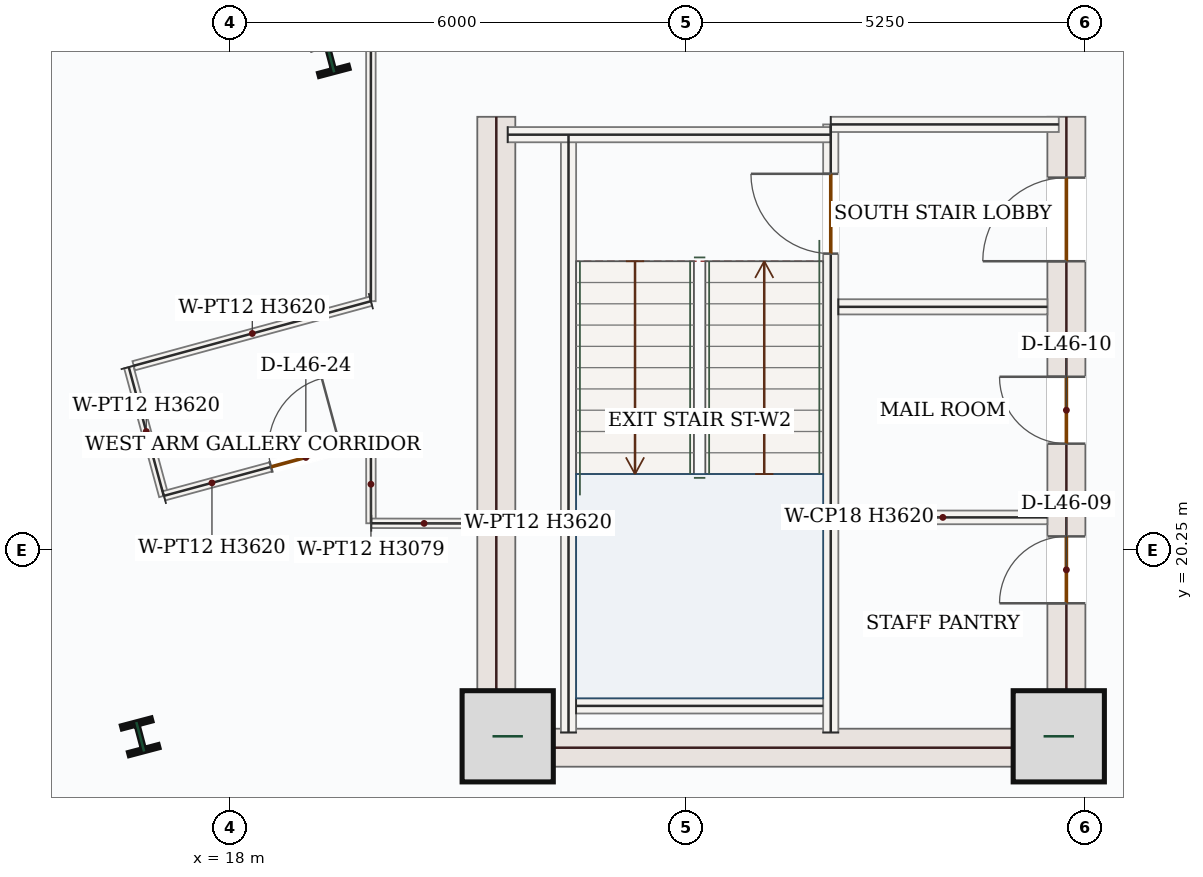
"""IFC4 building model, lengths in metres.
Left out: names, types, materials, properties, quantities, classifications, styles, units other than length and angle.
Written with IfcOpenShell. Run it as: python <this file> out.ifc"""

import sys

from ifc_helpers import new_model, si_unit, direction, frame, frame_2d, origin, origin_2d, place, context, subcontext, project, spatial, rectangle, i_section, extrude, source, transform, mapped, element, fill, save


model = new_model("IFC4")
c1 = context("Model", 3, precision=1e-05, world=origin(), true_north=direction((0.0, 1.0)))
c2 = subcontext(c1, "Body", "Model", "MODEL_VIEW")
j1 = project(units=[si_unit("LENGTHUNIT", "METRE"), si_unit("PLANEANGLEUNIT", "RADIAN")], contexts=[c1])
p1 = place(None, origin())
s1 = spatial("IfcSite", under=j1, at=p1, CompositionType="ELEMENT")
p2 = place(p1, origin())
s2 = spatial("IfcBuilding", under=s1, at=p2, CompositionType="ELEMENT")
p3 = place(p2, frame((0.0, 0.0, 198.0)))
s3 = spatial("IfcBuildingStorey", under=s2, at=p3, CompositionType="ELEMENT", Elevation=198.0)
m1 = source(origin(), c2, "Body", "SweptSolid", [
    extrude(rectangle(XDim=8.55, YDim=0.5, at=frame_2d((4.275, 0.0))), origin(), (0.0, 0.0, 1.0), 3.62),
])
p4 = place(p3, frame((21.5, 17.4, 0.0), z_axis=(0.0, 0.0, 1.0), x_axis=(0.0, 1.0, 0.0)))
e1 = element("IfcWall", 1, at=p4, inside=s3, PredefinedType="SHEAR", context=c2, shape_type="MappedRepresentation", body=[
    mapped(m1, transform((0.0, 0.0, 0.0), x_axis=(1.0, 0.0, 0.0), y_axis=(0.0, 1.0, 0.0), z_axis=(0.0, 0.0, 1.0), scale=1.0)),
])
p5 = place(p3, frame((29.0, 17.4, 0.0), z_axis=(0.0, 0.0, 1.0), x_axis=(0.0, 1.0, 0.0)))
e2 = element("IfcWall", 2, at=p5, inside=s3, PredefinedType="SHEAR", context=c2, shape_type="SweptSolid", body=[
    extrude(rectangle(XDim=8.55, YDim=0.5, at=frame_2d((4.275, 0.0))), origin(), (0.0, 0.0, 1.0), 3.62),
])
p6 = place(p5, frame((6.65, 0.0, 0.0)))
e3 = element("IfcOpeningElement", 3, at=p6, cuts=e2, PredefinedType="OPENING", context=c2, shape_type="SweptSolid", body=[
    extrude(rectangle(XDim=1.1, YDim=2.2, at=frame_2d((0.55, 1.1))), frame((0.0, 0.26, 0.0), z_axis=(0.0, -1.0, 0.0), x_axis=(1.0, 0.0, 0.0)), (0.0, 0.0, 1.0), 0.52),
])
p7 = place(p5, frame((2.15, 0.0, 0.0)))
e4 = element("IfcOpeningElement", 4, at=p7, cuts=e2, PredefinedType="OPENING", context=c2, shape_type="SweptSolid", body=[
    extrude(rectangle(XDim=0.88, YDim=2.1, at=frame_2d((0.44, 1.05))), frame((0.0, 0.26, 0.0), z_axis=(0.0, -1.0, 0.0), x_axis=(1.0, 0.0, 0.0)), (0.0, 0.0, 1.0), 0.52),
])
p8 = place(p5, frame((4.25, 0.0, 0.0)))
e5 = element("IfcOpeningElement", 5, at=p8, cuts=e2, PredefinedType="OPENING", context=c2, shape_type="SweptSolid", body=[
    extrude(rectangle(XDim=0.88, YDim=2.1, at=frame_2d((0.44, 1.05))), frame((0.0, 0.26, 0.0), z_axis=(0.0, -1.0, 0.0), x_axis=(1.0, 0.0, 0.0)), (0.0, 0.0, 1.0), 0.52),
])
m2 = source(origin(), c2, "Body", "SweptSolid", [
    extrude(rectangle(XDim=7.0, YDim=0.5, at=frame_2d((3.5, 0.0))), origin(), (0.0, 0.0, 1.0), 3.62),
])
p9 = place(p3, frame((21.75, 17.65, 0.0), z_axis=(0.0, 0.0, 1.0), x_axis=(1.0, 0.0, 0.0)))
e6 = element("IfcWall", 6, at=p9, inside=s3, PredefinedType="SHEAR", context=c2, shape_type="MappedRepresentation", body=[
    mapped(m2, transform((0.0, 0.0, 0.0), x_axis=(1.0, 0.0, 0.0), y_axis=(0.0, 1.0, 0.0), z_axis=(0.0, 0.0, 1.0), scale=1.0)),
])
m3 = source(origin(), c2, "Body", "SweptSolid", [
    extrude(rectangle(XDim=1.2, YDim=1.2, at=origin_2d()), origin(), (0.0, 0.0, 1.0), 3.9),
])
for number, where, z_axis, x_axis in (
    (7, (21.65, 17.8, 0.0), (0.0, 0.0, 1.0), (1.0, 0.0, 0.0)),
    (8, (28.9, 17.8, 0.0), (0.0, 0.0, 1.0), (1.0, 0.0, 0.0)),
):
    element("IfcColumn", number, at=place(p3, frame(where, z_axis=z_axis, x_axis=x_axis)), inside=s3, PredefinedType="COLUMN", context=c2, shape_type="MappedRepresentation", body=[
        mapped(m3, transform((0.0, 0.0, 0.0), x_axis=(1.0, 0.0, 0.0), y_axis=(0.0, 1.0, 0.0), z_axis=(0.0, 0.0, 1.0), scale=1.0)),
    ])
m4 = source(origin(), c2, "Body", "SweptSolid", [
    extrude(i_section(OverallWidth=0.404, OverallDepth=0.407, WebThickness=0.027, FlangeThickness=0.044, FilletRadius=0.018, at=origin_2d()), origin(), (0.0, 0.0, 1.0), 3.9),
])
for number, where, z_axis, x_axis in (
    (9, (19.316, 26.729, 0.0), (0.0, 0.0, 1.0), (0.967, 0.255, 0.0)),
    (10, (16.815, 17.794, 0.0), (0.0, 0.0, 1.0), (0.967, 0.255, 0.0)),
):
    element("IfcColumn", number, at=place(p3, frame(where, z_axis=z_axis, x_axis=x_axis)), inside=s3, PredefinedType="COLUMN", context=c2, shape_type="MappedRepresentation", body=[
        mapped(m4, transform((0.0, 0.0, 0.0), x_axis=(1.0, 0.0, 0.0), y_axis=(0.0, 1.0, 0.0), z_axis=(0.0, 0.0, 1.0), scale=1.0)),
    ])
m5 = source(origin(), c2, "Body", "SweptSolid", [
    extrude(rectangle(XDim=9.291, YDim=0.28, at=frame_2d((4.646, 0.0))), origin(), (0.0, 0.0, 1.0), 3.62),
])
p10 = place(p3, frame((9.974, 26.83, 0.0), z_axis=(0.0, 0.0, 1.0), x_axis=(0.965014433153, 0.262196765439, 0.0)))
e11 = element("IfcWall", 11, at=p10, inside=s3, PredefinedType="SOLIDWALL", context=c2, shape_type="MappedRepresentation", body=[
    mapped(m5, transform((0.0, 0.0, 0.0), x_axis=(1.0, 0.0, 0.0), y_axis=(0.0, 1.0, 0.0), z_axis=(0.0, 0.0, 1.0), scale=1.0)),
])
m6 = source(origin(), c2, "Body", "SweptSolid", [
    extrude(rectangle(XDim=7.87, YDim=0.2, at=frame_2d((3.935, 0.0))), origin(), (0.0, 0.0, 1.0), 3.62),
])
p11 = place(p3, frame((22.45, 17.85, 0.0), z_axis=(0.0, 0.0, 1.0), x_axis=(0.0, 1.0, 0.0)))
e12 = element("IfcWall", 12, at=p11, inside=s3, PredefinedType="SOLIDWALL", context=c2, shape_type="MappedRepresentation", body=[
    mapped(m6, transform((0.0, 0.0, 0.0), x_axis=(1.0, 0.0, 0.0), y_axis=(0.0, 1.0, 0.0), z_axis=(0.0, 0.0, 1.0), scale=1.0)),
])
p12 = place(p3, frame((25.9, 17.85, 0.0), z_axis=(0.0, 0.0, 1.0), x_axis=(0.0, 1.0, 0.0)))
e13 = element("IfcWall", 13, at=p12, inside=s3, PredefinedType="SOLIDWALL", context=c2, shape_type="SweptSolid", body=[
    extrude(rectangle(XDim=8.0, YDim=0.2, at=frame_2d((4.0, 0.0))), origin(), (0.0, 0.0, 1.0), 3.62),
])
p13 = place(p12, frame((6.3, 0.0, 0.0)))
e14 = element("IfcOpeningElement", 14, at=p13, cuts=e13, PredefinedType="OPENING", context=c2, shape_type="SweptSolid", body=[
    extrude(rectangle(XDim=1.05, YDim=2.15, at=frame_2d((0.525, 1.075))), frame((0.0, 0.11, 0.0), z_axis=(0.0, -1.0, 0.0), x_axis=(1.0, 0.0, 0.0)), (0.0, 0.0, 1.0), 0.22),
])
m7 = source(origin(), c2, "Body", "SweptSolid", [
    extrude(rectangle(XDim=4.25, YDim=0.2, at=frame_2d((2.125, 0.0))), origin(), (0.0, 0.0, 1.0), 3.62),
])
p14 = place(p3, frame((21.65, 25.715, 0.0), z_axis=(0.0, 0.0, 1.0), x_axis=(1.0, 0.0, 0.0)))
e15 = element("IfcWall", 15, at=p14, inside=s3, PredefinedType="SOLIDWALL", context=c2, shape_type="MappedRepresentation", body=[
    mapped(m7, transform((0.0, 0.0, 0.0), x_axis=(1.0, 0.0, 0.0), y_axis=(0.0, 1.0, 0.0), z_axis=(0.0, 0.0, 1.0), scale=1.0)),
])
m8 = source(origin(), c2, "Body", "SweptSolid", [
    extrude(rectangle(XDim=3.0, YDim=0.2, at=frame_2d((1.5, 0.0))), origin(), (0.0, 0.0, 1.0), 3.62),
])
p15 = place(p3, frame((25.9, 25.85, 0.0), z_axis=(0.0, 0.0, 1.0), x_axis=(1.0, 0.0, 0.0)))
e16 = element("IfcWall", 16, at=p15, inside=s3, PredefinedType="SOLIDWALL", context=c2, shape_type="MappedRepresentation", body=[
    mapped(m8, transform((0.0, 0.0, 0.0), x_axis=(1.0, 0.0, 0.0), y_axis=(0.0, 1.0, 0.0), z_axis=(0.0, 0.0, 1.0), scale=1.0)),
])
m9 = source(origin(), c2, "Body", "SweptSolid", [
    extrude(rectangle(XDim=3.25, YDim=0.2, at=frame_2d((1.625, 0.0))), origin(), (0.0, 0.0, 1.0), 3.62),
])
p16 = place(p3, frame((22.55, 18.2, 0.0), z_axis=(0.0, 0.0, 1.0), x_axis=(1.0, 0.0, 0.0)))
e17 = element("IfcWall", 17, at=p16, inside=s3, PredefinedType="SOLIDWALL", context=c2, shape_type="MappedRepresentation", body=[
    mapped(m9, transform((0.0, 0.0, 0.0), x_axis=(1.0, 0.0, 0.0), y_axis=(0.0, 1.0, 0.0), z_axis=(0.0, 0.0, 1.0), scale=1.0)),
])
m10 = source(origin(), c2, "Body", "SweptSolid", [
    extrude(rectangle(XDim=2.75, YDim=0.2, at=frame_2d((1.375, 0.0))), origin(), (0.0, 0.0, 1.0), 3.62),
])
p17 = place(p3, frame((26.0, 23.45, 0.0), z_axis=(0.0, 0.0, 1.0), x_axis=(1.0, 0.0, 0.0)))
e18 = element("IfcWall", 18, at=p17, inside=s3, PredefinedType="SOLIDWALL", context=c2, shape_type="MappedRepresentation", body=[
    mapped(m10, transform((0.0, 0.0, 0.0), x_axis=(1.0, 0.0, 0.0), y_axis=(0.0, 1.0, 0.0), z_axis=(0.0, 0.0, 1.0), scale=1.0)),
])
m11 = source(origin(), c2, "Body", "SweptSolid", [
    extrude(rectangle(XDim=2.75, YDim=0.18, at=frame_2d((1.375, 0.0))), origin(), (0.0, 0.0, 1.0), 3.62),
])
p18 = place(p3, frame((26.0, 20.68, 0.0), z_axis=(0.0, 0.0, 1.0), x_axis=(1.0, 0.0, 0.0)))
e19 = element("IfcWall", 19, at=p18, inside=s3, PredefinedType="PARTITIONING", context=c2, shape_type="MappedRepresentation", body=[
    mapped(m11, transform((0.0, 0.0, 0.0), x_axis=(1.0, 0.0, 0.0), y_axis=(0.0, 1.0, 0.0), z_axis=(0.0, 0.0, 1.0), scale=1.0)),
])
m12 = source(origin(), c2, "Body", "SweptSolid", [
    extrude(rectangle(XDim=1.756, YDim=0.125, at=frame_2d((0.878, 0.0))), origin(), (0.0, 0.0, 1.0), 3.62),
])
p19 = place(p3, frame((16.665, 22.657, 0.0), z_axis=(0.0, 0.0, 1.0), x_axis=(0.262246637243, -0.965000881479, 0.0)))
e20 = element("IfcWall", 20, at=p19, inside=s3, PredefinedType="PARTITIONING", context=c2, shape_type="MappedRepresentation", body=[
    mapped(m12, transform((0.0, 0.0, 0.0), x_axis=(1.0, 0.0, 0.0), y_axis=(0.0, 1.0, 0.0), z_axis=(0.0, 0.0, 1.0), scale=1.0)),
])
p20 = place(p3, frame((17.127, 20.963, 0.0), z_axis=(0.0, 0.0, 1.0), x_axis=(0.965283220267, 0.261205483616, 0.0)))
e21 = element("IfcWall", 21, at=p20, inside=s3, PredefinedType="PARTITIONING", context=c2, shape_type="SweptSolid", body=[
    extrude(rectangle(XDim=2.821, YDim=0.125, at=frame_2d((1.41, 0.0))), origin(), (0.0, 0.0, 1.0), 3.62),
])
p21 = place(p20, frame((1.459, 0.0, 0.0)))
e22 = element("IfcOpeningElement", 22, at=p21, cuts=e21, PredefinedType="OPENING", context=c2, shape_type="SweptSolid", body=[
    extrude(rectangle(XDim=0.95, YDim=2.15, at=frame_2d((0.475, 1.075))), frame((0.0, 0.073, 0.0), z_axis=(0.0, -1.0, 0.0), x_axis=(1.0, 0.0, 0.0)), (0.0, 0.0, 1.0), 0.145),
])
m13 = source(origin(), c2, "Body", "SweptSolid", [
    extrude(rectangle(XDim=1.028, YDim=0.125, at=frame_2d((0.514, 0.0))), origin(), (0.0, 0.0, 1.0), 3.079),
])
p22 = place(p3, frame((19.85, 21.63, 0.0), z_axis=(0.0, 0.0, 1.0), x_axis=(0.001187365584, -0.999999295081, 0.0)))
e23 = element("IfcWall", 23, at=p22, inside=s3, PredefinedType="PARTITIONING", context=c2, shape_type="MappedRepresentation", body=[
    mapped(m13, transform((0.0, 0.0, 0.0), x_axis=(1.0, 0.0, 0.0), y_axis=(0.0, 1.0, 0.0), z_axis=(0.0, 0.0, 1.0), scale=1.0)),
])
m14 = source(origin(), c2, "Body", "SweptSolid", [
    extrude(rectangle(XDim=1.39, YDim=0.125, at=frame_2d((0.695, 0.0))), origin(), (0.0, 0.0, 1.0), 3.62),
])
p23 = place(p3, frame((19.855, 20.602, 0.0), z_axis=(0.0, 0.0, 1.0), x_axis=(0.999998750398, -0.001580886835, 0.0)))
e24 = element("IfcWall", 24, at=p23, inside=s3, PredefinedType="PARTITIONING", context=c2, shape_type="MappedRepresentation", body=[
    mapped(m14, transform((0.0, 0.0, 0.0), x_axis=(1.0, 0.0, 0.0), y_axis=(0.0, 1.0, 0.0), z_axis=(0.0, 0.0, 1.0), scale=1.0)),
])
m15 = source(origin(), c2, "Body", "SweptSolid", [
    extrude(rectangle(XDim=9.809, YDim=0.125, at=frame_2d((4.904, 0.0))), origin(), (0.0, 0.0, 1.0), 2.693),
])
p24 = place(p3, frame((19.85, 33.333, 0.0), z_axis=(0.0, 0.0, 1.0), x_axis=(-2.4890482e-05, -0.99999999969, 0.0)))
e25 = element("IfcWall", 25, at=p24, inside=s3, PredefinedType="PARTITIONING", context=c2, shape_type="MappedRepresentation", body=[
    mapped(m15, transform((0.0, 0.0, 0.0), x_axis=(1.0, 0.0, 0.0), y_axis=(0.0, 1.0, 0.0), z_axis=(0.0, 0.0, 1.0), scale=1.0)),
])
m16 = source(origin(), c2, "Body", "SweptSolid", [
    extrude(rectangle(XDim=3.234, YDim=0.125, at=frame_2d((1.617, 0.0))), origin(), (0.0, 0.0, 1.0), 3.62),
])
p25 = place(p3, frame((19.85, 23.524, 0.0), z_axis=(0.0, 0.0, 1.0), x_axis=(-0.964930881857, -0.262504082327, 0.0)))
e26 = element("IfcWall", 26, at=p25, inside=s3, PredefinedType="PARTITIONING", context=c2, shape_type="MappedRepresentation", body=[
    mapped(m16, transform((0.0, 0.0, 0.0), x_axis=(1.0, 0.0, 0.0), y_axis=(0.0, 1.0, 0.0), z_axis=(0.0, 0.0, 1.0), scale=1.0)),
])
m17 = source(origin(), c2, "Body", "SweptSolid", [
    extrude(rectangle(XDim=1.05, YDim=2.15, at=frame_2d((0.525, 1.075))), frame((0.0, 0.025, 0.0), z_axis=(0.0, -1.0, 0.0), x_axis=(1.0, 0.0, 0.0)), (0.0, 0.0, 1.0), 0.05),
])
p26 = place(p13, origin())
e27 = element("IfcDoor", 27, at=p26, inside=s3, OperationType="SINGLE_SWING_RIGHT", PredefinedType="DOOR", context=c2, shape_type="MappedRepresentation", body=[
    mapped(m17, transform((0.0, 0.0, 0.0), x_axis=(1.0, 0.0, 0.0), y_axis=(0.0, 1.0, 0.0), z_axis=(0.0, 0.0, 1.0), scale=1.0)),
])
fill(e14, e27)
m18 = source(origin(), c2, "Body", "SweptSolid", [
    extrude(rectangle(XDim=1.1, YDim=2.2, at=frame_2d((0.55, 1.1))), frame((0.0, 0.025, 0.0), z_axis=(0.0, -1.0, 0.0), x_axis=(1.0, 0.0, 0.0)), (0.0, 0.0, 1.0), 0.05),
])
p27 = place(p6, origin())
e28 = element("IfcDoor", 28, at=p27, inside=s3, OperationType="SINGLE_SWING_LEFT", PredefinedType="DOOR", context=c2, shape_type="MappedRepresentation", body=[
    mapped(m18, transform((0.0, 0.0, 0.0), x_axis=(1.0, 0.0, 0.0), y_axis=(0.0, 1.0, 0.0), z_axis=(0.0, 0.0, 1.0), scale=1.0)),
])
fill(e3, e28)
m19 = source(origin(), c2, "Body", "SweptSolid", [
    extrude(rectangle(XDim=0.88, YDim=2.1, at=frame_2d((0.44, 1.05))), frame((0.0, 0.025, 0.0), z_axis=(0.0, -1.0, 0.0), x_axis=(1.0, 0.0, 0.0)), (0.0, 0.0, 1.0), 0.05),
])
p28 = place(p7, origin())
e29 = element("IfcDoor", 29, at=p28, inside=s3, OperationType="SINGLE_SWING_LEFT", PredefinedType="DOOR", context=c2, shape_type="MappedRepresentation", body=[
    mapped(m19, transform((0.0, 0.0, 0.0), x_axis=(1.0, 0.0, 0.0), y_axis=(0.0, 1.0, 0.0), z_axis=(0.0, 0.0, 1.0), scale=1.0)),
])
fill(e4, e29)
p29 = place(p8, origin())
e30 = element("IfcDoor", 30, at=p29, inside=s3, OperationType="SINGLE_SWING_RIGHT", PredefinedType="DOOR", context=c2, shape_type="MappedRepresentation", body=[
    mapped(m19, transform((0.0, 0.0, 0.0), x_axis=(1.0, 0.0, 0.0), y_axis=(0.0, 1.0, 0.0), z_axis=(0.0, 0.0, 1.0), scale=1.0)),
])
fill(e5, e30)
m20 = source(origin(), c2, "Body", "SweptSolid", [
    extrude(rectangle(XDim=0.95, YDim=2.15, at=frame_2d((0.475, 1.075))), frame((0.0, 0.025, 0.0), z_axis=(0.0, -1.0, 0.0), x_axis=(1.0, 0.0, 0.0)), (0.0, 0.0, 1.0), 0.05),
])
p30 = place(p21, origin())
e31 = element("IfcDoor", 31, at=p30, inside=s3, OperationType="SINGLE_SWING_RIGHT", PredefinedType="DOOR", context=c2, shape_type="MappedRepresentation", body=[
    mapped(m20, transform((0.0, 0.0, 0.0), x_axis=(1.0, 0.0, 0.0), y_axis=(0.0, 1.0, 0.0), z_axis=(0.0, 0.0, 1.0), scale=1.0)),
])
fill(e22, e31)
save(model, sys.argv[1])
